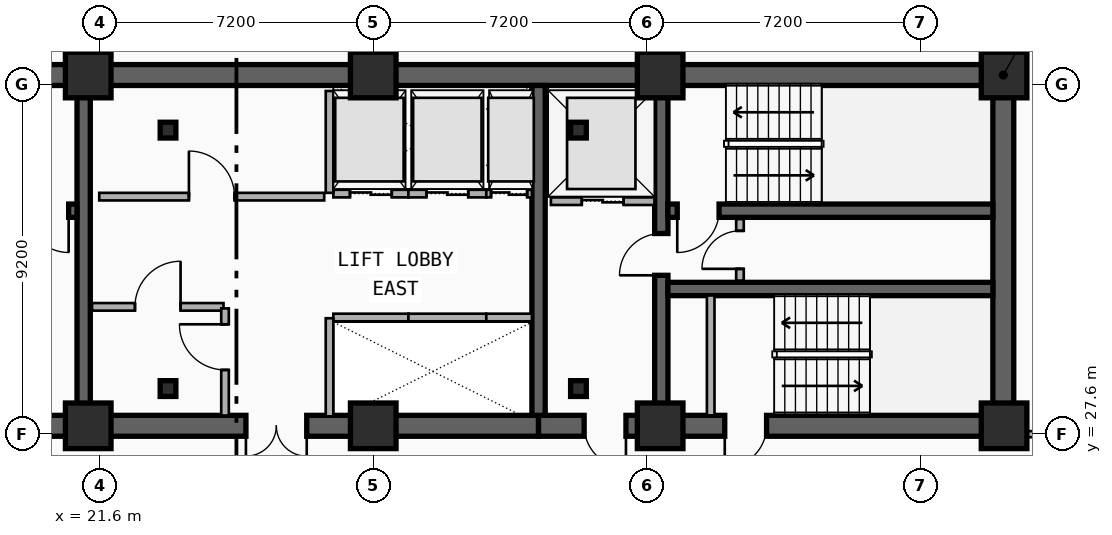
"""IFC4 building model, lengths in metres.
Left out: names, types, materials, properties, quantities, classifications, styles, units other than length and angle.
Written with IfcOpenShell. Run it as: python <this file> out.ifc"""

import sys

from ifc_helpers import new_model, si_unit, direction, frame, frame_2d, origin, origin_2d, place, context, subcontext, project, spatial, rectangle, i_section, extrude, element, fill, save


model = new_model("IFC4")
c1 = context("Model", 3, precision=1e-05, world=origin(), true_north=direction((0.0, 1.0)))
c2 = subcontext(c1, "Body", "Model", "MODEL_VIEW")
j1 = project(units=[si_unit("LENGTHUNIT", "METRE"), si_unit("PLANEANGLEUNIT", "RADIAN")], contexts=[c1])
p1 = place(None, origin())
s1 = spatial("IfcSite", under=j1, at=p1, CompositionType="ELEMENT")
p2 = place(p1, origin())
s2 = spatial("IfcBuilding", under=s1, at=p2, CompositionType="ELEMENT")
p3 = place(p2, frame((0.0, 0.0, 144.8)))
s3 = spatial("IfcBuildingStorey", under=s2, at=p3, CompositionType="ELEMENT", Elevation=144.8)
p4 = place(p3, frame((12.15, 37.05, 0.0), z_axis=(0.0, 0.0, 1.0), x_axis=(1.0, 0.0, 0.0)))
e1 = element("IfcWall", 1, at=p4, inside=s3, PredefinedType="SHEAR", context=c2, shape_type="SweptSolid", body=[
    extrude(rectangle(XDim=33.23, YDim=0.55, at=frame_2d((16.615, 0.0))), origin(), (0.0, 0.0, 1.0), 3.55),
])
p5 = place(p3, frame((21.18, 27.82, 0.0), z_axis=(0.0, 0.0, 1.0), x_axis=(-1.0, 0.0, 0.0)))
e2 = element("IfcWall", 2, at=p5, inside=s3, PredefinedType="SHEAR", context=c2, shape_type="SweptSolid", body=[
    extrude(rectangle(XDim=9.03, YDim=0.55, at=frame_2d((4.515, 0.0))), origin(), (0.0, 0.0, 1.0), 3.55),
])
p6 = place(p5, frame((2.68, 0.0, 0.0)))
e3 = element("IfcOpeningElement", 3, at=p6, cuts=e2, PredefinedType="OPENING", context=c2, shape_type="SweptSolid", body=[
    extrude(rectangle(XDim=1.1, YDim=2.15, at=frame_2d((0.55, 1.075))), frame((0.0, 0.285, 0.0), z_axis=(0.0, -1.0, 0.0), x_axis=(1.0, 0.0, 0.0)), (0.0, 0.0, 1.0), 0.57),
])
p7 = place(p3, frame((33.15, 27.82, 0.0), z_axis=(0.0, 0.0, 1.0), x_axis=(-1.0, 0.0, 0.0)))
e4 = element("IfcWall", 4, at=p7, inside=s3, PredefinedType="SHEAR", context=c2, shape_type="SweptSolid", body=[
    extrude(rectangle(XDim=11.97, YDim=0.55, at=frame_2d((5.985, 0.0))), origin(), (0.0, 0.0, 1.0), 3.55),
])
p8 = place(p7, frame((6.1, 0.0, 0.0)))
e5 = element("IfcOpeningElement", 5, at=p8, cuts=e4, PredefinedType="OPENING", context=c2, shape_type="SweptSolid", body=[
    extrude(rectangle(XDim=1.6, YDim=2.2, at=frame_2d((0.8, 1.1))), frame((0.0, 0.285, 0.0), z_axis=(0.0, -1.0, 0.0), x_axis=(1.0, 0.0, 0.0)), (0.0, 0.0, 1.0), 0.57),
])
p9 = place(p3, frame((45.38, 27.82, 0.0), z_axis=(0.0, 0.0, 1.0), x_axis=(-1.0, 0.0, 0.0)))
e6 = element("IfcWall", 6, at=p9, inside=s3, PredefinedType="SHEAR", context=c2, shape_type="SweptSolid", body=[
    extrude(rectangle(XDim=12.23, YDim=0.55, at=frame_2d((6.115, 0.0))), origin(), (0.0, 0.0, 1.0), 3.55),
])
p10 = place(p9, frame((9.93, 0.0, 0.0)))
e7 = element("IfcOpeningElement", 7, at=p10, cuts=e6, PredefinedType="OPENING", context=c2, shape_type="SweptSolid", body=[
    extrude(rectangle(XDim=1.1, YDim=2.15, at=frame_2d((0.55, 1.075))), frame((0.0, 0.285, 0.0), z_axis=(0.0, -1.0, 0.0), x_axis=(1.0, 0.0, 0.0)), (0.0, 0.0, 1.0), 0.57),
])
p11 = place(p9, frame((6.23, 0.0, 0.0)))
e8 = element("IfcOpeningElement", 8, at=p11, cuts=e6, PredefinedType="OPENING", context=c2, shape_type="SweptSolid", body=[
    extrude(rectangle(XDim=1.1, YDim=2.15, at=frame_2d((0.55, 1.075))), frame((0.0, 0.285, 0.0), z_axis=(0.0, -1.0, 0.0), x_axis=(1.0, 0.0, 0.0)), (0.0, 0.0, 1.0), 0.57),
])
p12 = place(p3, frame((45.38, 28.095, 0.0), z_axis=(0.0, 0.0, 1.0), x_axis=(0.0, 1.0, 0.0)))
e9 = element("IfcWall", 9, at=p12, inside=s3, PredefinedType="SHEAR", context=c2, shape_type="SweptSolid", body=[
    extrude(rectangle(XDim=8.68, YDim=0.55, at=frame_2d((4.34, 0.0))), origin(), (0.0, 0.0, 1.0), 3.55),
])
for number, where, z_axis, x_axis in (
    (10, (21.18, 28.095, 0.0), (0.0, 0.0, 1.0), (0.0, 1.0, 0.0)),
    (11, (33.15, 28.095, 0.0), (0.0, 0.0, 1.0), (0.0, 1.0, 0.0)),
):
    element("IfcWall", number, at=place(p3, frame(where, z_axis=z_axis, x_axis=x_axis)), inside=s3, PredefinedType="SHEAR", context=c2, shape_type="SweptSolid", body=[
        extrude(rectangle(XDim=8.68, YDim=0.35, at=frame_2d((4.34, 0.0))), origin(), (0.0, 0.0, 1.0), 3.55),
    ])
p13 = place(p3, frame((36.38, 28.095, 0.0), z_axis=(0.0, 0.0, 1.0), x_axis=(0.0, 1.0, 0.0)))
e12 = element("IfcWall", 12, at=p13, inside=s3, PredefinedType="SHEAR", context=c2, shape_type="SweptSolid", body=[
    extrude(rectangle(XDim=8.68, YDim=0.35, at=frame_2d((4.34, 0.0))), origin(), (0.0, 0.0, 1.0), 3.55),
])
p14 = place(p13, frame((3.685, 0.0, 0.0)))
e13 = element("IfcOpeningElement", 13, at=p14, cuts=e12, PredefinedType="OPENING", context=c2, shape_type="SweptSolid", body=[
    extrude(rectangle(XDim=1.1, YDim=2.15, at=frame_2d((0.55, 1.075))), frame((0.0, 0.185, 0.0), z_axis=(0.0, -1.0, 0.0), x_axis=(1.0, 0.0, 0.0)), (0.0, 0.0, 1.0), 0.37),
])
p15 = place(p3, frame((21.005, 33.48, 0.0), z_axis=(0.0, 0.0, 1.0), x_axis=(-1.0, 0.0, 0.0)))
e14 = element("IfcWall", 14, at=p15, inside=s3, PredefinedType="SHEAR", context=c2, shape_type="SweptSolid", body=[
    extrude(rectangle(XDim=8.58, YDim=0.35, at=frame_2d((4.29, 0.0))), origin(), (0.0, 0.0, 1.0), 3.55),
])
p16 = place(p15, frame((0.22, 0.0, 0.0)))
e15 = element("IfcOpeningElement", 15, at=p16, cuts=e14, PredefinedType="OPENING", context=c2, shape_type="SweptSolid", body=[
    extrude(rectangle(XDim=1.1, YDim=2.15, at=frame_2d((0.55, 1.075))), frame((0.0, 0.185, 0.0), z_axis=(0.0, -1.0, 0.0), x_axis=(1.0, 0.0, 0.0)), (0.0, 0.0, 1.0), 0.37),
])
p17 = place(p3, frame((45.105, 33.48, 0.0), z_axis=(0.0, 0.0, 1.0), x_axis=(-1.0, 0.0, 0.0)))
e16 = element("IfcWall", 16, at=p17, inside=s3, PredefinedType="SHEAR", context=c2, shape_type="SweptSolid", body=[
    extrude(rectangle(XDim=8.55, YDim=0.35, at=frame_2d((4.275, 0.0))), origin(), (0.0, 0.0, 1.0), 3.55),
])
p18 = place(p17, frame((7.205, 0.0, 0.0)))
e17 = element("IfcOpeningElement", 17, at=p18, cuts=e16, PredefinedType="OPENING", context=c2, shape_type="SweptSolid", body=[
    extrude(rectangle(XDim=1.1, YDim=2.15, at=frame_2d((0.55, 1.075))), frame((0.0, 0.185, 0.0), z_axis=(0.0, -1.0, 0.0), x_axis=(1.0, 0.0, 0.0)), (0.0, 0.0, 1.0), 0.37),
])
p19 = place(p3, frame((36.555, 31.42, 0.0), z_axis=(0.0, 0.0, 1.0), x_axis=(1.0, 0.0, 0.0)))
e18 = element("IfcWall", 18, at=p19, inside=s3, PredefinedType="SHEAR", context=c2, shape_type="SweptSolid", body=[
    extrude(rectangle(XDim=8.55, YDim=0.35, at=frame_2d((4.275, 0.0))), origin(), (0.0, 0.0, 1.0), 3.55),
])
for number, where, z_axis, x_axis in (
    (19, (23.4, 28.8, 0.0), (0.0, 0.0, 1.0), (1.0, 0.0, 0.0)),
    (20, (34.2, 28.8, 0.0), (0.0, 0.0, 1.0), (1.0, 0.0, 0.0)),
    (21, (34.2, 35.6, 0.0), (0.0, 0.0, 1.0), (1.0, 0.0, 0.0)),
    (22, (23.4, 35.6, 0.0), (0.0, 0.0, 1.0), (1.0, 0.0, 0.0)),
):
    element("IfcColumn", number, at=place(p3, frame(where, z_axis=z_axis, x_axis=x_axis)), inside=s3, PredefinedType="COLUMN", context=c2, shape_type="SweptSolid", body=[
        extrude(i_section(OverallWidth=0.413, OverallDepth=0.415, WebThickness=0.03, FlangeThickness=0.047, FilletRadius=0.015, at=origin_2d()), origin(), (0.0, 0.0, 1.0), 3.55),
    ])
for number, where, z_axis, x_axis in (
    (23, (21.3, 27.82, 0.0), (0.0, 0.0, 1.0), (1.0, 0.0, 0.0)),
    (24, (21.3, 37.05, 0.0), (0.0, 0.0, 1.0), (1.0, 0.0, 0.0)),
    (25, (28.8, 27.82, 0.0), (0.0, 0.0, 1.0), (1.0, 0.0, 0.0)),
    (26, (28.8, 37.05, 0.0), (0.0, 0.0, 1.0), (1.0, 0.0, 0.0)),
    (27, (36.35, 27.82, 0.0), (0.0, 0.0, 1.0), (1.0, 0.0, 0.0)),
    (28, (36.35, 37.05, 0.0), (0.0, 0.0, 1.0), (1.0, 0.0, 0.0)),
    (29, (45.4, 27.82, 0.0), (0.0, 0.0, 1.0), (1.0, 0.0, 0.0)),
    (30, (45.4, 37.05, 0.0), (0.0, 0.0, 1.0), (1.0, 0.0, 0.0)),
):
    element("IfcColumn", number, at=place(p3, frame(where, z_axis=z_axis, x_axis=x_axis)), inside=s3, PredefinedType="COLUMN", context=c2, shape_type="SweptSolid", body=[
        extrude(rectangle(XDim=1.2, YDim=1.2, at=origin_2d()), origin(), (0.0, 0.0, 1.0), 3.55),
    ])
p20 = place(p3, frame((33.475, 33.73, 0.0), z_axis=(0.0, 0.0, 1.0), x_axis=(1.0, 0.0, 0.0)))
e31 = element("IfcWall", 31, at=p20, inside=s3, PredefinedType="PARTITIONING", context=c2, shape_type="SweptSolid", body=[
    extrude(rectangle(XDim=2.725, YDim=0.2, at=frame_2d((1.362, 0.0))), origin(), (0.0, 0.0, 1.0), 2.36),
])
p21 = place(p20, frame((0.812, 0.0, 0.0)))
e32 = element("IfcOpeningElement", 32, at=p21, cuts=e31, PredefinedType="OPENING", context=c2, shape_type="SweptSolid", body=[
    extrude(rectangle(XDim=1.1, YDim=2.15, at=frame_2d((0.55, 1.075))), frame((0.0, 0.11, 0.0), z_axis=(0.0, -1.0, 0.0), x_axis=(1.0, 0.0, 0.0)), (0.0, 0.0, 1.0), 0.22),
])
p22 = place(p3, frame((27.75, 30.67, 0.0), z_axis=(0.0, 0.0, 1.0), x_axis=(1.0, 0.0, 0.0)))
e33 = element("IfcWall", 33, at=p22, inside=s3, PredefinedType="PARTITIONING", context=c2, shape_type="SweptSolid", body=[
    extrude(rectangle(XDim=1.975, YDim=0.2, at=frame_2d((0.988, 0.0))), origin(), (0.0, 0.0, 1.0), 2.36),
])
p23 = place(p3, frame((27.65, 28.07, 0.0), z_axis=(0.0, 0.0, 1.0), x_axis=(0.0, 1.0, 0.0)))
e34 = element("IfcWall", 34, at=p23, inside=s3, PredefinedType="PARTITIONING", context=c2, shape_type="SweptSolid", body=[
    extrude(rectangle(XDim=2.58, YDim=0.2, at=frame_2d((1.29, 0.0))), origin(), (0.0, 0.0, 1.0), 2.36),
])
p24 = place(p3, frame((29.725, 30.67, 0.0), z_axis=(0.0, 0.0, 1.0), x_axis=(1.0, 0.0, 0.0)))
e35 = element("IfcWall", 35, at=p24, inside=s3, PredefinedType="PARTITIONING", context=c2, shape_type="SweptSolid", body=[
    extrude(rectangle(XDim=2.05, YDim=0.2, at=frame_2d((1.025, 0.0))), origin(), (0.0, 0.0, 1.0), 2.67),
])
p25 = place(p3, frame((31.775, 30.67, 0.0), z_axis=(0.0, 0.0, 1.0), x_axis=(1.0, 0.0, 0.0)))
e36 = element("IfcWall", 36, at=p25, inside=s3, PredefinedType="PARTITIONING", context=c2, shape_type="SweptSolid", body=[
    extrude(rectangle(XDim=1.2, YDim=0.2, at=frame_2d((0.6, 0.0))), origin(), (0.0, 0.0, 1.0), 2.67),
])
p26 = place(p3, frame((27.75, 33.93, 0.0), z_axis=(0.0, 0.0, 1.0), x_axis=(1.0, 0.0, 0.0)))
e37 = element("IfcWall", 37, at=p26, inside=s3, PredefinedType="PARTITIONING", context=c2, shape_type="SweptSolid", body=[
    extrude(rectangle(XDim=1.975, YDim=0.2, at=frame_2d((0.988, 0.0))), origin(), (0.0, 0.0, 1.0), 2.36),
])
p27 = place(p26, frame((0.438, 0.0, 0.0)))
e38 = element("IfcOpeningElement", 38, at=p27, cuts=e37, PredefinedType="OPENING", context=c2, shape_type="SweptSolid", body=[
    extrude(rectangle(XDim=1.1, YDim=2.15, at=frame_2d((0.55, 1.075))), frame((0.0, 0.11, 0.0), z_axis=(0.0, -1.0, 0.0), x_axis=(1.0, 0.0, 0.0)), (0.0, 0.0, 1.0), 0.22),
])
p28 = place(p3, frame((27.65, 33.95, 0.0), z_axis=(0.0, 0.0, 1.0), x_axis=(0.0, 1.0, 0.0)))
e39 = element("IfcWall", 39, at=p28, inside=s3, PredefinedType="PARTITIONING", context=c2, shape_type="SweptSolid", body=[
    extrude(rectangle(XDim=2.68, YDim=0.2, at=frame_2d((1.34, 0.0))), origin(), (0.0, 0.0, 1.0), 2.36),
])
p29 = place(p3, frame((29.725, 33.93, 0.0), z_axis=(0.0, 0.0, 1.0), x_axis=(1.0, 0.0, 0.0)))
e40 = element("IfcWall", 40, at=p29, inside=s3, PredefinedType="PARTITIONING", context=c2, shape_type="SweptSolid", body=[
    extrude(rectangle(XDim=2.05, YDim=0.2, at=frame_2d((1.025, 0.0))), origin(), (0.0, 0.0, 1.0), 3.29),
])
p30 = place(p29, frame((0.475, 0.0, 0.0)))
e41 = element("IfcOpeningElement", 41, at=p30, cuts=e40, PredefinedType="OPENING", context=c2, shape_type="SweptSolid", body=[
    extrude(rectangle(XDim=1.1, YDim=2.15, at=frame_2d((0.55, 1.075))), frame((0.0, 0.11, 0.0), z_axis=(0.0, -1.0, 0.0), x_axis=(1.0, 0.0, 0.0)), (0.0, 0.0, 1.0), 0.22),
])
p31 = place(p3, frame((31.775, 33.93, 0.0), z_axis=(0.0, 0.0, 1.0), x_axis=(1.0, 0.0, 0.0)))
e42 = element("IfcWall", 42, at=p31, inside=s3, PredefinedType="PARTITIONING", context=c2, shape_type="SweptSolid", body=[
    extrude(rectangle(XDim=1.2, YDim=0.2, at=frame_2d((0.6, 0.0))), origin(), (0.0, 0.0, 1.0), 3.29),
])
p32 = place(p31, frame((0.125, 0.0, 0.0)))
e43 = element("IfcOpeningElement", 43, at=p32, cuts=e42, PredefinedType="OPENING", context=c2, shape_type="SweptSolid", body=[
    extrude(rectangle(XDim=0.95, YDim=2.15, at=frame_2d((0.475, 1.075))), frame((0.0, 0.11, 0.0), z_axis=(0.0, -1.0, 0.0), x_axis=(1.0, 0.0, 0.0)), (0.0, 0.0, 1.0), 0.22),
])
p33 = place(p3, frame((37.68, 28.095, 0.0), z_axis=(0.0, 0.0, 1.0), x_axis=(0.0, 1.0, 0.0)))
e44 = element("IfcWall", 44, at=p33, inside=s3, PredefinedType="PARTITIONING", context=c2, shape_type="SweptSolid", body=[
    extrude(rectangle(XDim=3.155, YDim=0.2, at=frame_2d((1.578, 0.0))), origin(), (0.0, 0.0, 1.0), 2.67),
])
p34 = place(p3, frame((38.45, 31.64, 0.0), z_axis=(0.0, 0.0, 1.0), x_axis=(0.0, 1.0, 0.0)))
e45 = element("IfcWall", 45, at=p34, inside=s3, PredefinedType="PARTITIONING", context=c2, shape_type="SweptSolid", body=[
    extrude(rectangle(XDim=1.62, YDim=0.2, at=frame_2d((0.81, 0.0))), origin(), (0.0, 0.0, 1.0), 3.29),
])
p35 = place(p34, frame((0.31, 0.0, 0.0)))
e46 = element("IfcOpeningElement", 46, at=p35, cuts=e45, PredefinedType="OPENING", context=c2, shape_type="SweptSolid", body=[
    extrude(rectangle(XDim=1.0, YDim=2.15, at=frame_2d((0.5, 1.075))), frame((0.0, 0.11, 0.0), z_axis=(0.0, -1.0, 0.0), x_axis=(1.0, 0.0, 0.0)), (0.0, 0.0, 1.0), 0.22),
])
p36 = place(p3, frame((21.4, 30.95, 0.0), z_axis=(0.0, 0.0, 1.0), x_axis=(1.0, 0.0, 0.0)))
e47 = element("IfcWall", 47, at=p36, inside=s3, PredefinedType="PARTITIONING", context=c2, shape_type="SweptSolid", body=[
    extrude(rectangle(XDim=3.46, YDim=0.2, at=frame_2d((1.73, 0.0))), origin(), (0.0, 0.0, 1.0), 2.36),
])
p37 = place(p36, frame((1.13, 0.0, 0.0)))
e48 = element("IfcOpeningElement", 48, at=p37, cuts=e47, PredefinedType="OPENING", context=c2, shape_type="SweptSolid", body=[
    extrude(rectangle(XDim=1.2, YDim=2.15, at=frame_2d((0.6, 1.075))), frame((0.0, 0.11, 0.0), z_axis=(0.0, -1.0, 0.0), x_axis=(1.0, 0.0, 0.0)), (0.0, 0.0, 1.0), 0.22),
])
p38 = place(p3, frame((21.59, 33.85, 0.0), z_axis=(0.0, 0.0, 1.0), x_axis=(1.0, 0.0, 0.0)))
e49 = element("IfcWall", 49, at=p38, inside=s3, PredefinedType="PARTITIONING", context=c2, shape_type="SweptSolid", body=[
    extrude(rectangle(XDim=5.92, YDim=0.2, at=frame_2d((2.96, 0.0))), origin(), (0.0, 0.0, 1.0), 2.36),
])
p39 = place(p38, frame((2.36, 0.0, 0.0)))
e50 = element("IfcOpeningElement", 50, at=p39, cuts=e49, PredefinedType="OPENING", context=c2, shape_type="SweptSolid", body=[
    extrude(rectangle(XDim=1.2, YDim=2.15, at=frame_2d((0.6, 1.075))), frame((0.0, 0.11, 0.0), z_axis=(0.0, -1.0, 0.0), x_axis=(1.0, 0.0, 0.0)), (0.0, 0.0, 1.0), 0.22),
])
p40 = place(p3, frame((24.9, 28.09, 0.0), z_axis=(0.0, 0.0, 1.0), x_axis=(0.0, 1.0, 0.0)))
e51 = element("IfcWall", 51, at=p40, inside=s3, PredefinedType="PARTITIONING", context=c2, shape_type="SweptSolid", body=[
    extrude(rectangle(XDim=2.82, YDim=0.2, at=frame_2d((1.41, 0.0))), origin(), (0.0, 0.0, 1.0), 2.67),
])
p41 = place(p40, frame((1.201, 0.0, 0.0)))
e52 = element("IfcOpeningElement", 52, at=p41, cuts=e51, PredefinedType="OPENING", context=c2, shape_type="SweptSolid", body=[
    extrude(rectangle(XDim=1.2, YDim=2.15, at=frame_2d((0.6, 1.075))), frame((0.0, 0.11, 0.0), z_axis=(0.0, -1.0, 0.0), x_axis=(1.0, 0.0, 0.0)), (0.0, 0.0, 1.0), 0.22),
])
p42 = place(p3, frame((45.41, 27.6, 0.0), z_axis=(0.0, 0.0, 1.0), x_axis=(1.0, 0.0, 0.0)))
e53 = element("IfcWall", 53, at=p42, inside=s3, PredefinedType="PARTITIONING", context=c2, shape_type="SweptSolid", body=[
    extrude(rectangle(XDim=0.91, YDim=0.16, at=frame_2d((0.455, 0.0))), origin(), (0.0, 0.0, 1.0), 2.36),
])
p43 = place(p21, origin())
e54 = element("IfcDoor", 54, at=p43, inside=s3, OperationType="DOUBLE_DOOR_SLIDING", PredefinedType="DOOR", context=c2, shape_type="SweptSolid", body=[
    extrude(rectangle(XDim=1.1, YDim=2.15, at=frame_2d((0.55, 1.075))), frame((0.0, 0.025, 0.0), z_axis=(0.0, -1.0, 0.0), x_axis=(1.0, 0.0, 0.0)), (0.0, 0.0, 1.0), 0.05),
])
fill(e32, e54)
p44 = place(p27, origin())
e55 = element("IfcDoor", 55, at=p44, inside=s3, OperationType="DOUBLE_DOOR_SLIDING", PredefinedType="DOOR", context=c2, shape_type="SweptSolid", body=[
    extrude(rectangle(XDim=1.1, YDim=2.15, at=frame_2d((0.55, 1.075))), frame((0.0, 0.025, 0.0), z_axis=(0.0, -1.0, 0.0), x_axis=(1.0, 0.0, 0.0)), (0.0, 0.0, 1.0), 0.05),
])
fill(e38, e55)
p45 = place(p30, origin())
e56 = element("IfcDoor", 56, at=p45, inside=s3, OperationType="DOUBLE_DOOR_SLIDING", PredefinedType="DOOR", context=c2, shape_type="SweptSolid", body=[
    extrude(rectangle(XDim=1.1, YDim=2.15, at=frame_2d((0.55, 1.075))), frame((0.0, 0.025, 0.0), z_axis=(0.0, -1.0, 0.0), x_axis=(1.0, 0.0, 0.0)), (0.0, 0.0, 1.0), 0.05),
])
fill(e41, e56)
p46 = place(p32, origin())
e57 = element("IfcDoor", 57, at=p46, inside=s3, OperationType="DOUBLE_DOOR_SLIDING", PredefinedType="DOOR", context=c2, shape_type="SweptSolid", body=[
    extrude(rectangle(XDim=0.95, YDim=2.15, at=frame_2d((0.475, 1.075))), frame((0.0, 0.025, 0.0), z_axis=(0.0, -1.0, 0.0), x_axis=(1.0, 0.0, 0.0)), (0.0, 0.0, 1.0), 0.05),
])
fill(e43, e57)
p47 = place(p16, origin())
e58 = element("IfcDoor", 58, at=p47, inside=s3, OperationType="SINGLE_SWING_LEFT", PredefinedType="DOOR", context=c2, shape_type="SweptSolid", body=[
    extrude(rectangle(XDim=1.1, YDim=2.15, at=frame_2d((0.55, 1.075))), frame((0.0, 0.025, 0.0), z_axis=(0.0, -1.0, 0.0), x_axis=(1.0, 0.0, 0.0)), (0.0, 0.0, 1.0), 0.05),
])
fill(e15, e58)
p48 = place(p18, origin())
e59 = element("IfcDoor", 59, at=p48, inside=s3, OperationType="SINGLE_SWING_RIGHT", PredefinedType="DOOR", context=c2, shape_type="SweptSolid", body=[
    extrude(rectangle(XDim=1.1, YDim=2.15, at=frame_2d((0.55, 1.075))), frame((0.0, 0.025, 0.0), z_axis=(0.0, -1.0, 0.0), x_axis=(1.0, 0.0, 0.0)), (0.0, 0.0, 1.0), 0.05),
])
fill(e17, e59)
p49 = place(p14, origin())
e60 = element("IfcDoor", 60, at=p49, inside=s3, OperationType="SINGLE_SWING_LEFT", PredefinedType="DOOR", context=c2, shape_type="SweptSolid", body=[
    extrude(rectangle(XDim=1.1, YDim=2.15, at=frame_2d((0.55, 1.075))), frame((0.0, 0.025, 0.0), z_axis=(0.0, -1.0, 0.0), x_axis=(1.0, 0.0, 0.0)), (0.0, 0.0, 1.0), 0.05),
])
fill(e13, e60)
p50 = place(p10, origin())
e61 = element("IfcDoor", 61, at=p50, inside=s3, OperationType="SINGLE_SWING_LEFT", PredefinedType="DOOR", context=c2, shape_type="SweptSolid", body=[
    extrude(rectangle(XDim=1.1, YDim=2.15, at=frame_2d((0.55, 1.075))), frame((0.0, 0.025, 0.0), z_axis=(0.0, -1.0, 0.0), x_axis=(1.0, 0.0, 0.0)), (0.0, 0.0, 1.0), 0.05),
])
fill(e7, e61)
p51 = place(p11, origin())
e62 = element("IfcDoor", 62, at=p51, inside=s3, OperationType="SINGLE_SWING_RIGHT", PredefinedType="DOOR", context=c2, shape_type="SweptSolid", body=[
    extrude(rectangle(XDim=1.1, YDim=2.15, at=frame_2d((0.55, 1.075))), frame((0.0, 0.025, 0.0), z_axis=(0.0, -1.0, 0.0), x_axis=(1.0, 0.0, 0.0)), (0.0, 0.0, 1.0), 0.05),
])
fill(e8, e62)
p52 = place(p8, origin())
e63 = element("IfcDoor", 63, at=p52, inside=s3, OperationType="SINGLE_SWING_LEFT", PredefinedType="DOOR", context=c2, shape_type="SweptSolid", body=[
    extrude(rectangle(XDim=1.6, YDim=2.2, at=frame_2d((0.8, 1.1))), frame((0.0, 0.025, 0.0), z_axis=(0.0, -1.0, 0.0), x_axis=(1.0, 0.0, 0.0)), (0.0, 0.0, 1.0), 0.05),
])
fill(e5, e63)
p53 = place(p35, origin())
e64 = element("IfcDoor", 64, at=p53, inside=s3, OperationType="SINGLE_SWING_LEFT", PredefinedType="DOOR", context=c2, shape_type="SweptSolid", body=[
    extrude(rectangle(XDim=1.0, YDim=2.15, at=frame_2d((0.5, 1.075))), frame((0.0, 0.025, 0.0), z_axis=(0.0, -1.0, 0.0), x_axis=(1.0, 0.0, 0.0)), (0.0, 0.0, 1.0), 0.05),
])
fill(e46, e64)
p54 = place(p37, origin())
e65 = element("IfcDoor", 65, at=p54, inside=s3, OperationType="SINGLE_SWING_RIGHT", PredefinedType="DOOR", context=c2, shape_type="SweptSolid", body=[
    extrude(rectangle(XDim=1.2, YDim=2.15, at=frame_2d((0.6, 1.075))), frame((0.0, 0.025, 0.0), z_axis=(0.0, -1.0, 0.0), x_axis=(1.0, 0.0, 0.0)), (0.0, 0.0, 1.0), 0.05),
])
fill(e48, e65)
p55 = place(p39, origin())
e66 = element("IfcDoor", 66, at=p55, inside=s3, OperationType="SINGLE_SWING_LEFT", PredefinedType="DOOR", context=c2, shape_type="SweptSolid", body=[
    extrude(rectangle(XDim=1.2, YDim=2.15, at=frame_2d((0.6, 1.075))), frame((0.0, 0.025, 0.0), z_axis=(0.0, -1.0, 0.0), x_axis=(1.0, 0.0, 0.0)), (0.0, 0.0, 1.0), 0.05),
])
fill(e50, e66)
p56 = place(p41, origin())
e67 = element("IfcDoor", 67, at=p56, inside=s3, OperationType="SINGLE_SWING_RIGHT", PredefinedType="DOOR", context=c2, shape_type="SweptSolid", body=[
    extrude(rectangle(XDim=1.2, YDim=2.15, at=frame_2d((0.6, 1.075))), frame((0.0, 0.025, 0.0), z_axis=(0.0, -1.0, 0.0), x_axis=(1.0, 0.0, 0.0)), (0.0, 0.0, 1.0), 0.05),
])
fill(e52, e67)
save(model, sys.argv[1])
